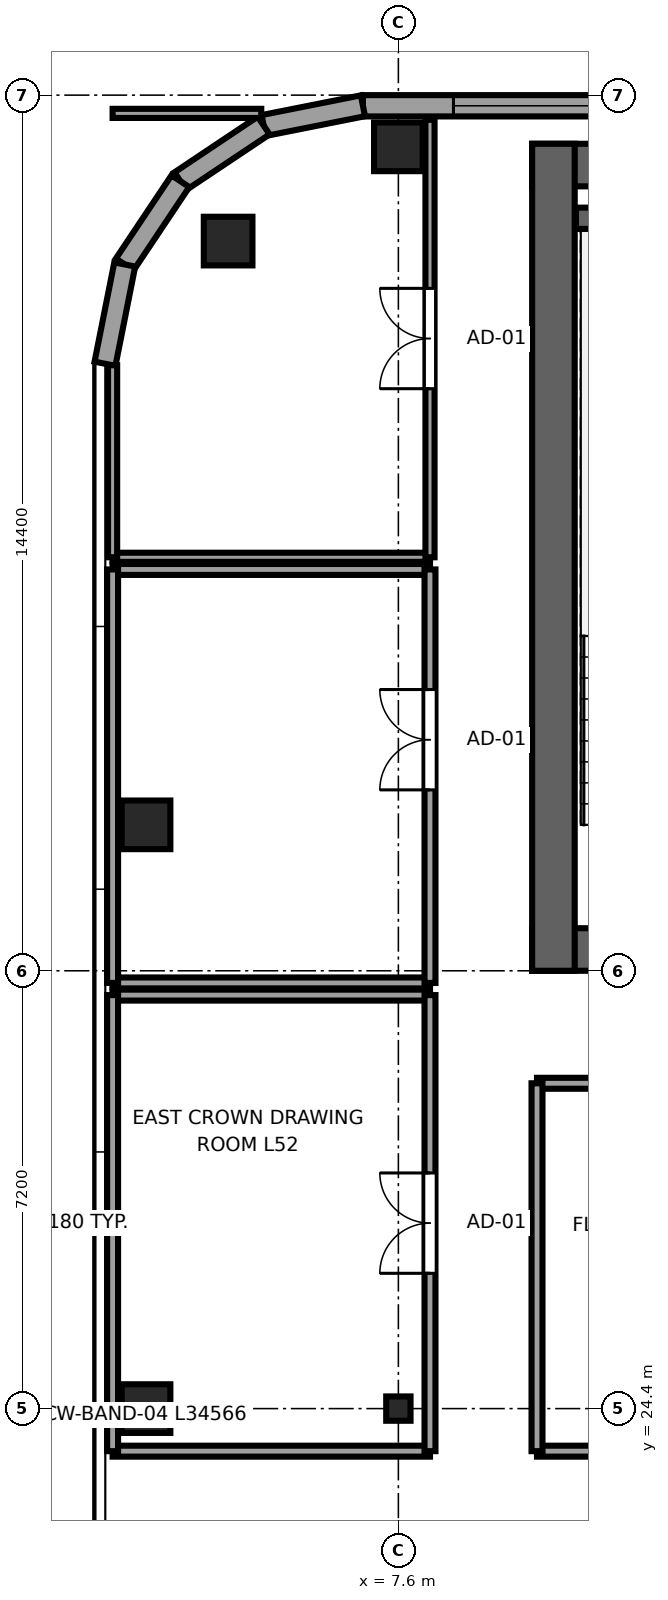
"""IFC4 building model, lengths in metres.
Left out: names, types, materials, properties, quantities, classifications, styles, units other than length and angle.
Written with IfcOpenShell. Run it as: python <this file> out.ifc"""

import sys

from ifc_helpers import new_model, si_unit, direction, frame, frame_2d, origin, origin_2d, place, context, subcontext, project, spatial, rectangle, i_section, extrude, source, transform, mapped, element, fill, save


model = new_model("IFC4")
c1 = context("Model", 3, precision=1e-05, world=origin(), true_north=direction((0.0, 1.0)))
c2 = subcontext(c1, "Body", "Model", "MODEL_VIEW")
j1 = project(units=[si_unit("LENGTHUNIT", "METRE"), si_unit("PLANEANGLEUNIT", "RADIAN")], contexts=[c1])
p1 = place(None, origin())
s1 = spatial("IfcSite", under=j1, at=p1, CompositionType="ELEMENT")
p2 = place(p1, origin())
s2 = spatial("IfcBuilding", under=s1, at=p2, CompositionType="ELEMENT")
p3 = place(p2, frame((0.0, 0.0, 198.2)))
s3 = spatial("IfcBuildingStorey", under=s2, at=p3, CompositionType="ELEMENT", Elevation=198.2)
p4 = place(p3, frame((9.8, 31.95, 0.0), z_axis=(0.0, 0.0, 1.0), x_axis=(1.0, 0.0, 0.0)))
e1 = element("IfcWall", 1, at=p4, inside=s3, PredefinedType="SHEAR", context=c2, shape_type="SweptSolid", body=[
    extrude(rectangle(XDim=26.4, YDim=0.7, at=frame_2d((13.2, 0.0))), origin(), (0.0, 0.0, 1.0), 3.55),
])
p5 = place(p4, frame((6.32, 0.0, 0.0), z_axis=(0.0, 0.0, 1.0), x_axis=(-1.0, 0.0, 0.0)))
e2 = element("IfcOpeningElement", 2, at=p5, cuts=e1, PredefinedType="OPENING", context=c2, shape_type="SweptSolid", body=[
    extrude(rectangle(XDim=1.5, YDim=2.04, at=frame_2d((0.75, 1.02))), frame((0.0, 0.36, 0.0), z_axis=(0.0, -1.0, 0.0), x_axis=(1.0, 0.0, 0.0)), (0.0, 0.0, 1.0), 0.72),
])
p6 = place(p4, frame((13.95, 0.0, 0.0), z_axis=(0.0, 0.0, 1.0), x_axis=(-1.0, 0.0, 0.0)))
e3 = element("IfcOpeningElement", 3, at=p6, cuts=e1, PredefinedType="OPENING", context=c2, shape_type="SweptSolid", body=[
    extrude(rectangle(XDim=1.5, YDim=2.04, at=frame_2d((0.75, 1.02))), frame((0.0, 0.36, 0.0), z_axis=(0.0, -1.0, 0.0), x_axis=(1.0, 0.0, 0.0)), (0.0, 0.0, 1.0), 0.72),
])
p7 = place(p4, frame((20.25, 0.0, 0.0), z_axis=(0.0, 0.0, 1.0), x_axis=(-1.0, 0.0, 0.0)))
e4 = element("IfcOpeningElement", 4, at=p7, cuts=e1, PredefinedType="OPENING", context=c2, shape_type="SweptSolid", body=[
    extrude(rectangle(XDim=1.5, YDim=2.04, at=frame_2d((0.75, 1.02))), frame((0.0, 0.36, 0.0), z_axis=(0.0, -1.0, 0.0), x_axis=(1.0, 0.0, 0.0)), (0.0, 0.0, 1.0), 0.72),
])
p8 = place(p4, frame((8.37, 0.0, 0.0), z_axis=(0.0, 0.0, 1.0), x_axis=(-1.0, 0.0, 0.0)))
e5 = element("IfcOpeningElement", 5, at=p8, cuts=e1, PredefinedType="OPENING", context=c2, shape_type="SweptSolid", body=[
    extrude(rectangle(XDim=0.82, YDim=2.01, at=frame_2d((0.41, 1.005))), frame((0.0, 0.36, 0.0), z_axis=(0.0, -1.0, 0.0), x_axis=(1.0, 0.0, 0.0)), (0.0, 0.0, 1.0), 0.72),
])
p9 = place(p3, frame((9.8, 44.85, 0.0), z_axis=(0.0, 0.0, 1.0), x_axis=(1.0, 0.0, 0.0)))
e6 = element("IfcWall", 6, at=p9, inside=s3, PredefinedType="SHEAR", context=c2, shape_type="SweptSolid", body=[
    extrude(rectangle(XDim=26.4, YDim=0.7, at=frame_2d((13.2, 0.0))), origin(), (0.0, 0.0, 1.0), 3.55),
])
p10 = place(p3, frame((10.15, 31.6, 0.0), z_axis=(0.0, 0.0, 1.0), x_axis=(0.0, 1.0, 0.0)))
e7 = element("IfcWall", 7, at=p10, inside=s3, PredefinedType="SHEAR", context=c2, shape_type="SweptSolid", body=[
    extrude(rectangle(XDim=13.6, YDim=0.7, at=frame_2d((6.8, 0.0))), origin(), (0.0, 0.0, 1.0), 3.55),
])
p11 = place(p3, frame((10.52, 43.975, 0.0), z_axis=(0.0, 0.0, 1.0), x_axis=(1.0, 0.0, 0.0)))
e8 = element("IfcWall", 8, at=p11, inside=s3, PredefinedType="SHEAR", context=c2, shape_type="SweptSolid", body=[
    extrude(rectangle(XDim=3.6, YDim=0.35, at=frame_2d((1.8, 0.0))), origin(), (0.0, 0.0, 1.0), 3.55),
])
m1 = source(origin(), c2, "Body", "SweptSolid", [
    extrude(rectangle(XDim=0.8, YDim=0.8, at=origin_2d()), origin(), (0.0, 0.0, 1.0), 3.55),
])
p12 = place(p3, frame((3.45, 24.4, 0.0), z_axis=(0.0, 0.0, 1.0), x_axis=(1.0, 0.0, 0.0)))
e9 = element("IfcColumn", 9, at=p12, inside=s3, PredefinedType="COLUMN", context=c2, shape_type="MappedRepresentation", body=[
    mapped(m1, transform((0.0, 0.0, 0.0), x_axis=(1.0, 0.0, 0.0), y_axis=(0.0, 1.0, 0.0), z_axis=(0.0, 0.0, 1.0), scale=1.0)),
])
m2 = source(origin(), c2, "Body", "SweptSolid", [
    extrude(i_section(OverallWidth=0.4, OverallDepth=0.4, WebThickness=0.02, FlangeThickness=0.035, at=origin_2d()), origin(), (0.0, 0.0, 1.0), 3.55),
])
p13 = place(p3, frame((7.6, 24.4, 0.0), z_axis=(0.0, 0.0, 1.0), x_axis=(1.0, 0.0, 0.0)))
e10 = element("IfcColumn", 10, at=p13, inside=s3, PredefinedType="COLUMN", context=c2, shape_type="MappedRepresentation", body=[
    mapped(m2, transform((0.0, 0.0, 0.0), x_axis=(1.0, 0.0, 0.0), y_axis=(0.0, 1.0, 0.0), z_axis=(0.0, 0.0, 1.0), scale=1.0)),
])
for number, where, z_axis, x_axis in (
    (11, (4.8, 43.6, 0.0), (0.0, 0.0, 1.0), (1.0, 0.0, 0.0)),
    (12, (7.6, 45.15, 0.0), (0.0, 0.0, 1.0), (1.0, 0.0, 0.0)),
    (13, (3.45, 34.0, 0.0), (0.0, 0.0, 1.0), (1.0, 0.0, 0.0)),
):
    element("IfcColumn", number, at=place(p3, frame(where, z_axis=z_axis, x_axis=x_axis)), inside=s3, PredefinedType="COLUMN", context=c2, shape_type="MappedRepresentation", body=[
        mapped(m1, transform((0.0, 0.0, 0.0), x_axis=(1.0, 0.0, 0.0), y_axis=(0.0, 1.0, 0.0), z_axis=(0.0, 0.0, 1.0), scale=1.0)),
    ])
p14 = place(p3, frame((49.983, 45.825, 0.0), z_axis=(0.0, 0.0, 1.0), x_axis=(-1.0, 0.0, 0.0)))
e14 = element("IfcWall", 14, at=p14, inside=s3, PredefinedType="SOLIDWALL", context=c2, shape_type="SweptSolid", body=[
    extrude(rectangle(XDim=42.966, YDim=0.35, at=frame_2d((21.483, 0.0))), origin(), (0.0, 0.0, 1.0), 3.37),
])
p15 = place(p14, frame((1.488, 0.0, 0.68)))
e15 = element("IfcOpeningElement", 15, at=p15, cuts=e14, PredefinedType="OPENING", context=c2, shape_type="SweptSolid", body=[
    extrude(rectangle(XDim=2.4, YDim=1.9, at=frame_2d((1.2, 0.95))), frame((0.0, 0.185, 0.0), z_axis=(0.0, -1.0, 0.0), x_axis=(1.0, 0.0, 0.0)), (0.0, 0.0, 1.0), 0.37),
])
p16 = place(p14, frame((9.841, 0.0, 0.68)))
e16 = element("IfcOpeningElement", 16, at=p16, cuts=e14, PredefinedType="OPENING", context=c2, shape_type="SweptSolid", body=[
    extrude(rectangle(XDim=2.4, YDim=1.9, at=frame_2d((1.2, 0.95))), frame((0.0, 0.185, 0.0), z_axis=(0.0, -1.0, 0.0), x_axis=(1.0, 0.0, 0.0)), (0.0, 0.0, 1.0), 0.37),
])
p17 = place(p14, frame((14.018, 0.0, 0.68)))
e17 = element("IfcOpeningElement", 17, at=p17, cuts=e14, PredefinedType="OPENING", context=c2, shape_type="SweptSolid", body=[
    extrude(rectangle(XDim=2.4, YDim=1.9, at=frame_2d((1.2, 0.95))), frame((0.0, 0.185, 0.0), z_axis=(0.0, -1.0, 0.0), x_axis=(1.0, 0.0, 0.0)), (0.0, 0.0, 1.0), 0.37),
])
p18 = place(p14, frame((18.195, 0.0, 0.68)))
e18 = element("IfcOpeningElement", 18, at=p18, cuts=e14, PredefinedType="OPENING", context=c2, shape_type="SweptSolid", body=[
    extrude(rectangle(XDim=2.4, YDim=1.9, at=frame_2d((1.2, 0.95))), frame((0.0, 0.185, 0.0), z_axis=(0.0, -1.0, 0.0), x_axis=(1.0, 0.0, 0.0)), (0.0, 0.0, 1.0), 0.37),
])
p19 = place(p14, frame((22.371, 0.0, 0.68)))
e19 = element("IfcOpeningElement", 19, at=p19, cuts=e14, PredefinedType="OPENING", context=c2, shape_type="SweptSolid", body=[
    extrude(rectangle(XDim=2.4, YDim=1.9, at=frame_2d((1.2, 0.95))), frame((0.0, 0.185, 0.0), z_axis=(0.0, -1.0, 0.0), x_axis=(1.0, 0.0, 0.0)), (0.0, 0.0, 1.0), 0.37),
])
p20 = place(p14, frame((26.548, 0.0, 0.68)))
e20 = element("IfcOpeningElement", 20, at=p20, cuts=e14, PredefinedType="OPENING", context=c2, shape_type="SweptSolid", body=[
    extrude(rectangle(XDim=2.4, YDim=1.9, at=frame_2d((1.2, 0.95))), frame((0.0, 0.185, 0.0), z_axis=(0.0, -1.0, 0.0), x_axis=(1.0, 0.0, 0.0)), (0.0, 0.0, 1.0), 0.37),
])
p21 = place(p14, frame((30.724, 0.0, 0.68)))
e21 = element("IfcOpeningElement", 21, at=p21, cuts=e14, PredefinedType="OPENING", context=c2, shape_type="SweptSolid", body=[
    extrude(rectangle(XDim=2.4, YDim=1.9, at=frame_2d((1.2, 0.95))), frame((0.0, 0.185, 0.0), z_axis=(0.0, -1.0, 0.0), x_axis=(1.0, 0.0, 0.0)), (0.0, 0.0, 1.0), 0.37),
])
p22 = place(p14, frame((34.901, 0.0, 0.68)))
e22 = element("IfcOpeningElement", 22, at=p22, cuts=e14, PredefinedType="OPENING", context=c2, shape_type="SweptSolid", body=[
    extrude(rectangle(XDim=2.4, YDim=1.9, at=frame_2d((1.2, 0.95))), frame((0.0, 0.185, 0.0), z_axis=(0.0, -1.0, 0.0), x_axis=(1.0, 0.0, 0.0)), (0.0, 0.0, 1.0), 0.37),
])
p23 = place(p14, frame((39.077, 0.0, 0.68)))
e23 = element("IfcOpeningElement", 23, at=p23, cuts=e14, PredefinedType="OPENING", context=c2, shape_type="SweptSolid", body=[
    extrude(rectangle(XDim=2.4, YDim=1.9, at=frame_2d((1.2, 0.95))), frame((0.0, 0.185, 0.0), z_axis=(0.0, -1.0, 0.0), x_axis=(1.0, 0.0, 0.0)), (0.0, 0.0, 1.0), 0.37),
])
p24 = place(p3, frame((7.017, 45.825, 0.0), z_axis=(0.0, 0.0, 1.0), x_axis=(-0.980788844421, -0.195072403631, 0.0)))
e24 = element("IfcWall", 24, at=p24, inside=s3, PredefinedType="SOLIDWALL", context=c2, shape_type="SweptSolid", body=[
    extrude(rectangle(XDim=1.665, YDim=0.35, at=frame_2d((0.832, 0.0))), origin(), (0.0, 0.0, 1.0), 3.37),
])
for number, where, z_axis, x_axis in (
    (25, (5.385, 45.5, 0.0), (0.0, 0.0, 1.0), (-0.832, -0.556, 0.0)),
    (26, (4.015, 44.585, 0.0), (0.0, 0.0, 1.0), (-0.556, -0.831, 0.0)),
):
    element("IfcWall", number, at=place(p3, frame(where, z_axis=z_axis, x_axis=x_axis)), inside=s3, PredefinedType="SOLIDWALL", context=c2, shape_type="SweptSolid", body=[
        extrude(rectangle(XDim=1.647, YDim=0.35, at=frame_2d((0.824, 0.0))), origin(), (0.0, 0.0, 1.0), 2.832),
    ])
p25 = place(p3, frame((3.1, 43.216, 0.0), z_axis=(0.0, 0.0, 1.0), x_axis=(-0.195044345786, -0.980794424524, 0.0)))
e27 = element("IfcWall", 27, at=p25, inside=s3, PredefinedType="SOLIDWALL", context=c2, shape_type="SweptSolid", body=[
    extrude(rectangle(XDim=1.665, YDim=0.35, at=frame_2d((0.833, 0.0))), origin(), (0.0, 0.0, 1.0), 3.37),
])
for number, where, z_axis, x_axis in (
    (28, (2.9, 23.7, 0.0), (0.0, 0.0, 1.0), (1.0, 0.0, 0.0)),
    (29, (2.9, 31.2, 0.0), (0.0, 0.0, 1.0), (1.0, 0.0, 0.0)),
):
    element("IfcWall", number, at=place(p3, frame(where, z_axis=z_axis, x_axis=x_axis)), inside=s3, PredefinedType="PARTITIONING", context=c2, shape_type="SweptSolid", body=[
        extrude(rectangle(XDim=5.22, YDim=0.18, at=frame_2d((2.61, 0.0))), origin(), (0.0, 0.0, 1.0), 3.37),
    ])
p26 = place(p3, frame((2.9, 23.7, 0.0), z_axis=(0.0, 0.0, 1.0), x_axis=(0.0, 1.0, 0.0)))
e30 = element("IfcWall", 30, at=p26, inside=s3, PredefinedType="PARTITIONING", context=c2, shape_type="SweptSolid", body=[
    extrude(rectangle(XDim=7.5, YDim=0.18, at=frame_2d((3.75, 0.0))), origin(), (0.0, 0.0, 1.0), 3.37),
])
p27 = place(p3, frame((8.12, 23.7, 0.0), z_axis=(0.0, 0.0, 1.0), x_axis=(0.0, 1.0, 0.0)))
e31 = element("IfcWall", 31, at=p27, inside=s3, PredefinedType="PARTITIONING", context=c2, shape_type="SweptSolid", body=[
    extrude(rectangle(XDim=7.5, YDim=0.18, at=frame_2d((3.75, 0.0))), origin(), (0.0, 0.0, 1.0), 3.37),
])
p28 = place(p27, frame((2.925, 0.0, 0.0)))
e32 = element("IfcOpeningElement", 32, at=p28, cuts=e31, PredefinedType="OPENING", context=c2, shape_type="SweptSolid", body=[
    extrude(rectangle(XDim=1.65, YDim=2.15, at=frame_2d((0.825, 1.075))), frame((0.0, 0.1, 0.0), z_axis=(0.0, -1.0, 0.0), x_axis=(1.0, 0.0, 0.0)), (0.0, 0.0, 1.0), 0.2),
])
for number, where, z_axis, x_axis in (
    (33, (2.9, 31.4, 0.0), (0.0, 0.0, 1.0), (1.0, 0.0, 0.0)),
    (34, (2.9, 38.2, 0.0), (0.0, 0.0, 1.0), (1.0, 0.0, 0.0)),
):
    element("IfcWall", number, at=place(p3, frame(where, z_axis=z_axis, x_axis=x_axis)), inside=s3, PredefinedType="PARTITIONING", context=c2, shape_type="SweptSolid", body=[
        extrude(rectangle(XDim=5.22, YDim=0.18, at=frame_2d((2.61, 0.0))), origin(), (0.0, 0.0, 1.0), 3.37),
    ])
p29 = place(p3, frame((2.9, 31.4, 0.0), z_axis=(0.0, 0.0, 1.0), x_axis=(0.0, 1.0, 0.0)))
e35 = element("IfcWall", 35, at=p29, inside=s3, PredefinedType="PARTITIONING", context=c2, shape_type="SweptSolid", body=[
    extrude(rectangle(XDim=6.8, YDim=0.18, at=frame_2d((3.4, 0.0))), origin(), (0.0, 0.0, 1.0), 3.37),
])
p30 = place(p3, frame((8.12, 31.4, 0.0), z_axis=(0.0, 0.0, 1.0), x_axis=(0.0, 1.0, 0.0)))
e36 = element("IfcWall", 36, at=p30, inside=s3, PredefinedType="PARTITIONING", context=c2, shape_type="SweptSolid", body=[
    extrude(rectangle(XDim=6.8, YDim=0.18, at=frame_2d((3.4, 0.0))), origin(), (0.0, 0.0, 1.0), 3.37),
])
p31 = place(p30, frame((3.175, 0.0, 0.0)))
e37 = element("IfcOpeningElement", 37, at=p31, cuts=e36, PredefinedType="OPENING", context=c2, shape_type="SweptSolid", body=[
    extrude(rectangle(XDim=1.65, YDim=2.15, at=frame_2d((0.825, 1.075))), frame((0.0, 0.1, 0.0), z_axis=(0.0, -1.0, 0.0), x_axis=(1.0, 0.0, 0.0)), (0.0, 0.0, 1.0), 0.2),
])
p32 = place(p3, frame((2.9, 38.4, 0.0), z_axis=(0.0, 0.0, 1.0), x_axis=(1.0, 0.0, 0.0)))
e38 = element("IfcWall", 38, at=p32, inside=s3, PredefinedType="PARTITIONING", context=c2, shape_type="SweptSolid", body=[
    extrude(rectangle(XDim=5.22, YDim=0.15, at=frame_2d((2.61, 0.0))), origin(), (0.0, 0.0, 1.0), 3.37),
])
p33 = place(p3, frame((2.9, 45.7, 0.0), z_axis=(0.0, 0.0, 1.0), x_axis=(1.0, 0.0, 0.0)))
e39 = element("IfcWall", 39, at=p33, inside=s3, PredefinedType="PARTITIONING", context=c2, shape_type="SweptSolid", body=[
    extrude(rectangle(XDim=2.445, YDim=0.15, at=frame_2d((1.223, 0.0))), origin(), (0.0, 0.0, 1.0), 3.37),
])
p34 = place(p3, frame((2.9, 38.4, 0.0), z_axis=(0.0, 0.0, 1.0), x_axis=(0.0, 1.0, 0.0)))
e40 = element("IfcWall", 40, at=p34, inside=s3, PredefinedType="PARTITIONING", context=c2, shape_type="SweptSolid", body=[
    extrude(rectangle(XDim=3.158, YDim=0.15, at=frame_2d((1.579, 0.0))), origin(), (0.0, 0.0, 1.0), 3.37),
])
p35 = place(p3, frame((8.12, 38.4, 0.0), z_axis=(0.0, 0.0, 1.0), x_axis=(0.0, 1.0, 0.0)))
e41 = element("IfcWall", 41, at=p35, inside=s3, PredefinedType="PARTITIONING", context=c2, shape_type="SweptSolid", body=[
    extrude(rectangle(XDim=7.195, YDim=0.15, at=frame_2d((3.598, 0.0))), origin(), (0.0, 0.0, 1.0), 3.37),
])
p36 = place(p35, frame((2.772, 0.0, 0.0)))
e42 = element("IfcOpeningElement", 42, at=p36, cuts=e41, PredefinedType="OPENING", context=c2, shape_type="SweptSolid", body=[
    extrude(rectangle(XDim=1.65, YDim=2.15, at=frame_2d((0.825, 1.075))), frame((0.0, 0.085, 0.0), z_axis=(0.0, -1.0, 0.0), x_axis=(1.0, 0.0, 0.0)), (0.0, 0.0, 1.0), 0.17),
])
p37 = place(p3, frame((9.88, 23.7, 0.0), z_axis=(0.0, 0.0, 1.0), x_axis=(1.0, 0.0, 0.0)))
e43 = element("IfcWall", 43, at=p37, inside=s3, PredefinedType="PARTITIONING", context=c2, shape_type="SweptSolid", body=[
    extrude(rectangle(XDim=4.22, YDim=0.18, at=frame_2d((2.11, 0.0))), origin(), (0.0, 0.0, 1.0), 3.37),
])
p38 = place(p37, frame((1.285, 0.0, 0.0)))
e44 = element("IfcOpeningElement", 44, at=p38, cuts=e43, PredefinedType="OPENING", context=c2, shape_type="SweptSolid", body=[
    extrude(rectangle(XDim=1.65, YDim=2.15, at=frame_2d((0.825, 1.075))), frame((0.0, 0.1, 0.0), z_axis=(0.0, -1.0, 0.0), x_axis=(1.0, 0.0, 0.0)), (0.0, 0.0, 1.0), 0.2),
])
p39 = place(p3, frame((9.88, 29.75, 0.0), z_axis=(0.0, 0.0, 1.0), x_axis=(1.0, 0.0, 0.0)))
e45 = element("IfcWall", 45, at=p39, inside=s3, PredefinedType="PARTITIONING", context=c2, shape_type="SweptSolid", body=[
    extrude(rectangle(XDim=4.22, YDim=0.18, at=frame_2d((2.11, 0.0))), origin(), (0.0, 0.0, 1.0), 3.37),
])
p40 = place(p3, frame((9.88, 23.7, 0.0), z_axis=(0.0, 0.0, 1.0), x_axis=(0.0, 1.0, 0.0)))
e46 = element("IfcWall", 46, at=p40, inside=s3, PredefinedType="PARTITIONING", context=c2, shape_type="SweptSolid", body=[
    extrude(rectangle(XDim=6.05, YDim=0.18, at=frame_2d((3.025, 0.0))), origin(), (0.0, 0.0, 1.0), 3.37),
])
m3 = source(origin(), c2, "Body", "SweptSolid", [
    extrude(rectangle(XDim=2.4, YDim=1.9, at=frame_2d((1.2, 0.95))), frame((0.0, 0.09, 0.0), z_axis=(0.0, -1.0, 0.0), x_axis=(1.0, 0.0, 0.0)), (0.0, 0.0, 1.0), 0.06),
])
p41 = place(p23, origin())
e47 = element("IfcWindow", 47, at=p41, inside=s3, PartitioningType="TRIPLE_PANEL_HORIZONTAL", PredefinedType="WINDOW", context=c2, shape_type="MappedRepresentation", body=[
    mapped(m3, transform((0.0, 0.0, 0.0), x_axis=(1.0, 0.0, 0.0), y_axis=(0.0, 1.0, 0.0), z_axis=(0.0, 0.0, 1.0), scale=1.0)),
])
fill(e23, e47)
m4 = source(origin(), c2, "Body", "SweptSolid", [
    extrude(rectangle(XDim=1.65, YDim=2.15, at=frame_2d((0.825, 1.075))), frame((0.0, 0.025, 0.0), z_axis=(0.0, -1.0, 0.0), x_axis=(1.0, 0.0, 0.0)), (0.0, 0.0, 1.0), 0.05),
])
p42 = place(p28, origin())
e48 = element("IfcDoor", 48, at=p42, inside=s3, OperationType="DOUBLE_DOOR_SINGLE_SWING", PredefinedType="DOOR", context=c2, shape_type="MappedRepresentation", body=[
    mapped(m4, transform((0.0, 0.0, 0.0), x_axis=(1.0, 0.0, 0.0), y_axis=(0.0, 1.0, 0.0), z_axis=(0.0, 0.0, 1.0), scale=1.0)),
])
fill(e32, e48)
p43 = place(p31, origin())
e49 = element("IfcDoor", 49, at=p43, inside=s3, OperationType="DOUBLE_DOOR_SINGLE_SWING", PredefinedType="DOOR", context=c2, shape_type="MappedRepresentation", body=[
    mapped(m4, transform((0.0, 0.0, 0.0), x_axis=(1.0, 0.0, 0.0), y_axis=(0.0, 1.0, 0.0), z_axis=(0.0, 0.0, 1.0), scale=1.0)),
])
fill(e37, e49)
p44 = place(p36, origin())
e50 = element("IfcDoor", 50, at=p44, inside=s3, OperationType="DOUBLE_DOOR_SINGLE_SWING", PredefinedType="DOOR", context=c2, shape_type="MappedRepresentation", body=[
    mapped(m4, transform((0.0, 0.0, 0.0), x_axis=(1.0, 0.0, 0.0), y_axis=(0.0, 1.0, 0.0), z_axis=(0.0, 0.0, 1.0), scale=1.0)),
])
fill(e42, e50)
save(model, sys.argv[1])
